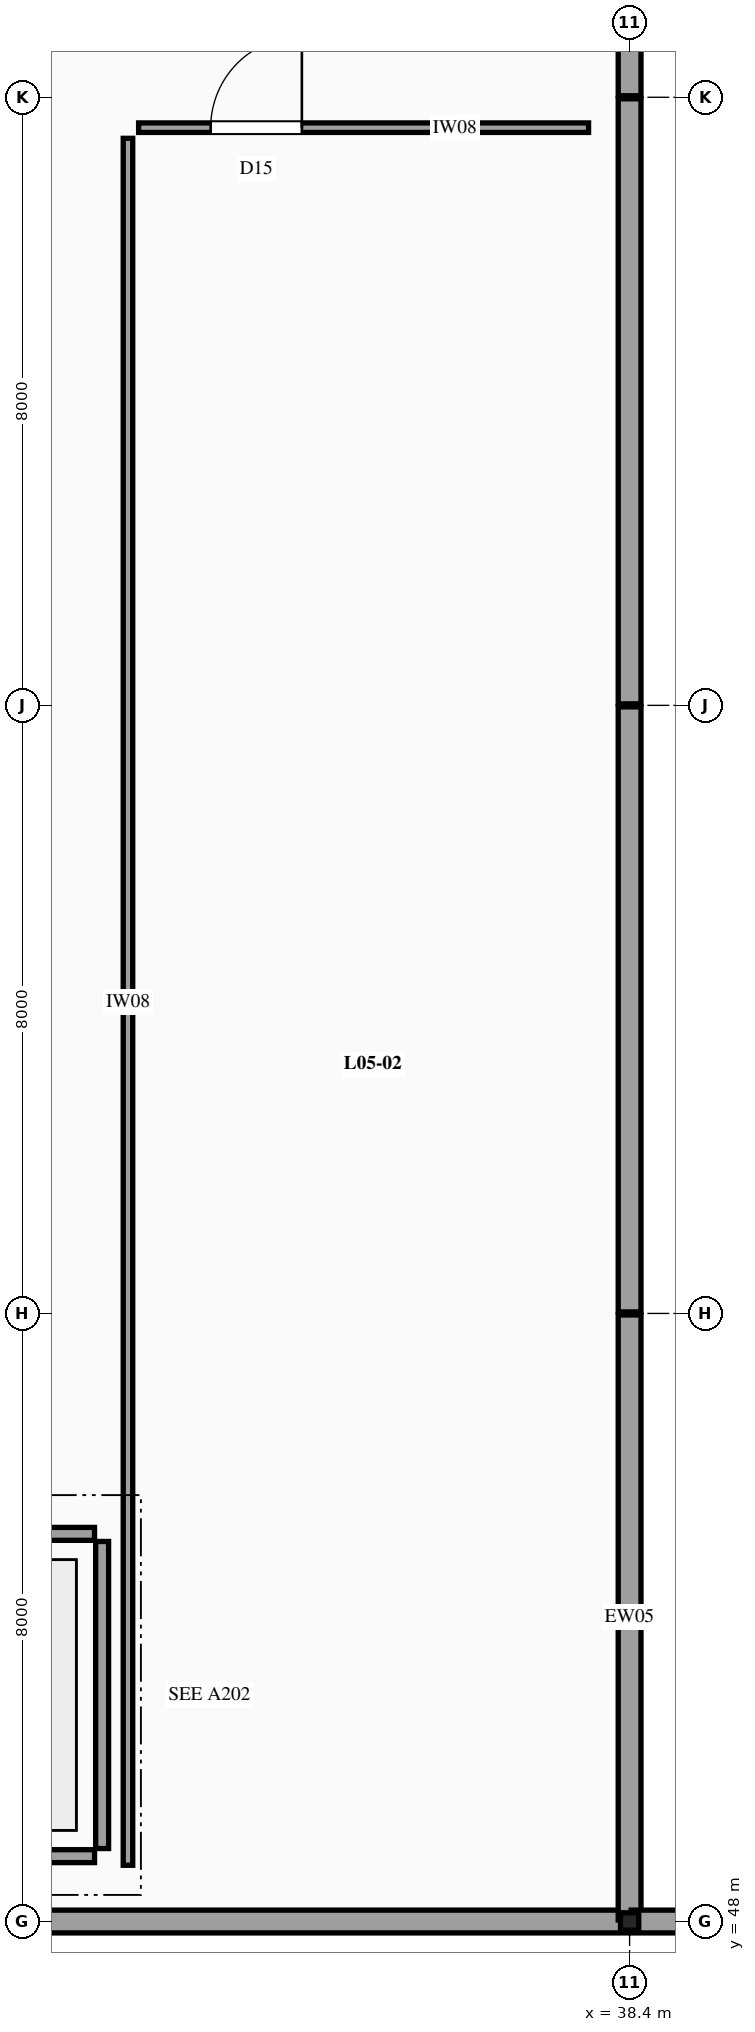
"""IFC4 building model, lengths in metres.
Left out: names, types, materials, properties, quantities, classifications, styles, units other than length and angle.
Written with IfcOpenShell. Run it as: python <this file> out.ifc"""

import sys

from ifc_helpers import new_model, si_unit, direction, frame, frame_2d, origin, origin_2d, place, context, subcontext, project, spatial, rectangle, i_section, extrude, element, fill, save


model = new_model("IFC4")
c1 = context("Model", 3, precision=1e-05, world=origin(), true_north=direction((0.0, 1.0)))
c2 = subcontext(c1, "Body", "Model", "MODEL_VIEW")
j1 = project(units=[si_unit("LENGTHUNIT", "METRE"), si_unit("PLANEANGLEUNIT", "RADIAN")], contexts=[c1])
p1 = place(None, origin())
s1 = spatial("IfcSite", under=j1, at=p1, CompositionType="ELEMENT")
p2 = place(p1, origin())
s2 = spatial("IfcBuilding", under=s1, at=p2, CompositionType="ELEMENT")
p3 = place(p2, frame((0.0, 0.0, 25.8)))
s3 = spatial("IfcBuildingStorey", under=s2, at=p3, CompositionType="ELEMENT", Elevation=25.8)
p4 = place(p3, frame((38.4, 48.0, -0.26), z_axis=(0.0, 0.0, 1.0), x_axis=(1.0, 0.0, 0.0)))
e1 = element("IfcColumn", 1, at=p4, inside=s3, PredefinedType="COLUMN", context=c2, shape_type="SweptSolid", body=[
    extrude(i_section(OverallWidth=0.24, OverallDepth=0.23, WebThickness=0.008, FlangeThickness=0.012, FilletRadius=0.021, at=origin_2d()), origin(), (0.0, 0.0, 1.0), 1.573),
])
p5 = place(p3, frame((28.82, 48.0, 0.0), z_axis=(0.0, 0.0, 1.0), x_axis=(1.0, 0.0, 0.0)))
e2 = element("IfcWall", 2, at=p5, inside=s3, PredefinedType="SOLIDWALL", context=c2, shape_type="SweptSolid", body=[
    extrude(rectangle(XDim=9.56, YDim=0.3, at=frame_2d((4.78, 0.0))), origin(), (0.0, 0.0, 1.0), 1.25),
])
for number, where, z_axis, x_axis in (
    (3, (38.4, 48.02, 0.0), (0.0, 0.0, 1.0), (0.0, 1.0, 0.0)),
    (4, (38.4, 56.02, 0.0), (0.0, 0.0, 1.0), (0.0, 1.0, 0.0)),
    (5, (38.4, 64.02, 0.0), (0.0, 0.0, 1.0), (0.0, 1.0, 0.0)),
    (6, (38.4, 72.02, 0.0), (0.0, 0.0, 1.0), (0.0, 1.0, 0.0)),
):
    element("IfcWall", number, at=place(p3, frame(where, z_axis=z_axis, x_axis=x_axis)), inside=s3, PredefinedType="SOLIDWALL", context=c2, shape_type="SweptSolid", body=[
        extrude(rectangle(XDim=7.96, YDim=0.3, at=frame_2d((3.98, 0.0))), origin(), (0.0, 0.0, 1.0), 0.75),
    ])
p6 = place(p3, frame((38.42, 48.0, -0.26), z_axis=(0.0, 0.0, 1.0), x_axis=(1.0, 0.0, 0.0)))
e7 = element("IfcWall", 7, at=p6, inside=s3, PredefinedType="SOLIDWALL", context=c2, shape_type="SweptSolid", body=[
    extrude(rectangle(XDim=9.56, YDim=0.3, at=frame_2d((4.78, 0.0))), origin(), (0.0, 0.0, 1.0), 0.455),
])
p7 = place(p3, frame((31.46, 48.96, 0.0), z_axis=(0.0, 0.0, 1.0), x_axis=(0.0, 1.0, 0.0)))
e8 = element("IfcWall", 8, at=p7, inside=s3, PredefinedType="SOLIDWALL", context=c2, shape_type="SweptSolid", body=[
    extrude(rectangle(XDim=4.04, YDim=0.17, at=frame_2d((2.02, 0.0))), origin(), (0.0, 0.0, 1.0), 2.35),
])
for number, where, z_axis, x_axis in (
    (9, (21.36, 48.86, 0.0), (0.0, 0.0, 1.0), (1.0, 0.0, 0.0)),
    (10, (21.36, 53.1, 0.0), (0.0, 0.0, 1.0), (1.0, 0.0, 0.0)),
):
    element("IfcWall", number, at=place(p3, frame(where, z_axis=z_axis, x_axis=x_axis)), inside=s3, PredefinedType="SOLIDWALL", context=c2, shape_type="SweptSolid", body=[
        extrude(rectangle(XDim=10.0, YDim=0.17, at=frame_2d((5.0, 0.0))), origin(), (0.0, 0.0, 1.0), 2.35),
    ])
p8 = place(p3, frame((31.94, 71.6, 0.0), z_axis=(0.0, 0.0, 1.0), x_axis=(1.0, 0.0, 0.0)))
e11 = element("IfcWall", 11, at=p8, inside=s3, PredefinedType="PARTITIONING", context=c2, shape_type="SweptSolid", body=[
    extrude(rectangle(XDim=5.92, YDim=0.125, at=frame_2d((2.96, 0.0))), origin(), (0.0, 0.0, 1.0), 2.35),
])
p9 = place(p8, frame((0.948, 0.0, 0.0)))
e12 = element("IfcOpeningElement", 12, at=p9, cuts=e11, PredefinedType="OPENING", context=c2, shape_type="SweptSolid", body=[
    extrude(rectangle(XDim=1.2, YDim=2.18, at=frame_2d((0.6, 1.09))), frame((0.0, 0.073, 0.0), z_axis=(0.0, -1.0, 0.0), x_axis=(1.0, 0.0, 0.0)), (0.0, 0.0, 1.0), 0.145),
])
p10 = place(p3, frame((31.8, 48.74, 0.0), z_axis=(0.0, 0.0, 1.0), x_axis=(0.0, 1.0, 0.0)))
e13 = element("IfcWall", 13, at=p10, inside=s3, PredefinedType="PARTITIONING", context=c2, shape_type="SweptSolid", body=[
    extrude(rectangle(XDim=22.72, YDim=0.125, at=frame_2d((11.36, 0.0))), origin(), (0.0, 0.0, 1.0), 2.35),
])
p11 = place(p9, origin())
e14 = element("IfcDoor", 14, at=p11, inside=s3, OperationType="SINGLE_SWING_RIGHT", PredefinedType="DOOR", context=c2, shape_type="SweptSolid", body=[
    extrude(rectangle(XDim=1.2, YDim=2.18, at=frame_2d((0.6, 1.09))), frame((0.0, 0.025, 0.0), z_axis=(0.0, -1.0, 0.0), x_axis=(1.0, 0.0, 0.0)), (0.0, 0.0, 1.0), 0.05),
])
fill(e12, e14)
save(model, sys.argv[1])
